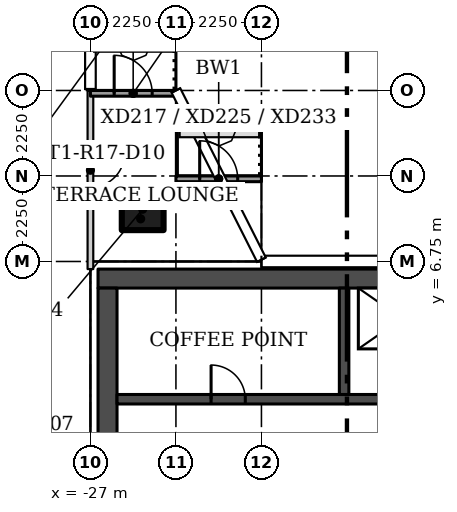
"""IFC4 building model, lengths in metres.
Left out: names, types, materials, properties, quantities, classifications, styles, units other than length and angle.
Written with IfcOpenShell. Run it as: python <this file> out.ifc"""

import sys

from ifc_helpers import new_model, si_unit, direction, frame, frame_2d, origin, origin_2d, place, context, subcontext, project, spatial, rectangle, hollow_rectangle, extrude, element, fill, save


model = new_model("IFC4")
c1 = context("Model", 3, precision=1e-05, world=origin(), true_north=direction((0.0, 1.0)))
c2 = subcontext(c1, "Body", "Model", "MODEL_VIEW")
j1 = project(units=[si_unit("LENGTHUNIT", "METRE"), si_unit("PLANEANGLEUNIT", "RADIAN")], contexts=[c1])
p1 = place(None, origin())
s1 = spatial("IfcSite", under=j1, at=p1, CompositionType="ELEMENT")
p2 = place(p1, origin())
s2 = spatial("IfcBuilding", under=s1, at=p2, CompositionType="ELEMENT")
p3 = place(p2, frame((0.0, 0.0, 150.6)))
s3 = spatial("IfcBuildingStorey", under=s2, at=p3, CompositionType="ELEMENT", Elevation=150.6)
p4 = place(p3, frame((-25.625, 8.125, 0.0)))
e1 = element("IfcColumn", 1, at=p4, inside=s3, PredefinedType="COLUMN", context=c2, shape_type="SweptSolid", body=[
    extrude(hollow_rectangle(XDim=1.1, YDim=1.1, WallThickness=0.04, at=origin_2d()), origin(), (0.0, 0.0, 1.0), 3.55),
])
p5 = place(p3, frame((-27.0, 11.25, 0.0), z_axis=(0.0, 0.0, 1.0), x_axis=(0.0, -1.0, 0.0)))
e2 = element("IfcWall", 2, at=p5, inside=s3, PredefinedType="PARTITIONING", context=c2, shape_type="SweptSolid", body=[
    extrude(rectangle(XDim=4.7, YDim=0.15, at=frame_2d((2.35, 0.0))), origin(), (0.0, 0.0, 1.0), 3.55),
])
p6 = place(p5, frame((1.65, 0.0, 0.0)))
e3 = element("IfcOpeningElement", 3, at=p6, cuts=e2, PredefinedType="OPENING", context=c2, shape_type="SweptSolid", body=[
    extrude(rectangle(XDim=0.9, YDim=2.1, at=frame_2d((0.45, 1.05))), frame((0.0, 0.085, 0.0), z_axis=(0.0, -1.0, 0.0), x_axis=(1.0, 0.0, 0.0)), (0.0, 0.0, 1.0), 0.17),
])
p7 = place(p3, frame((-24.75, 8.925, 0.0)))
e4 = element("IfcWall", 4, at=p7, inside=s3, PredefinedType="SOLIDWALL", context=c2, shape_type="SweptSolid", body=[
    extrude(rectangle(XDim=2.25, YDim=0.15, at=frame_2d((1.125, 0.0))), origin(), (0.0, 0.0, 1.0), 3.45),
])
p8 = place(p7, frame((0.625, 0.0, 0.0)))
e5 = element("IfcOpeningElement", 5, at=p8, cuts=e4, PredefinedType="OPENING", context=c2, shape_type="SweptSolid", body=[
    extrude(rectangle(XDim=1.0, YDim=2.4, at=frame_2d((0.5, 1.2))), frame((0.0, 0.085, 0.0), z_axis=(0.0, -1.0, 0.0), x_axis=(1.0, 0.0, 0.0)), (0.0, 0.0, 1.0), 0.17),
])
p9 = place(p3, frame((-27.0, 11.175, 0.0)))
e6 = element("IfcWall", 6, at=p9, inside=s3, PredefinedType="SOLIDWALL", context=c2, shape_type="SweptSolid", body=[
    extrude(rectangle(XDim=2.25, YDim=0.15, at=frame_2d((1.125, 0.0))), origin(), (0.0, 0.0, 1.0), 3.45),
])
p10 = place(p9, frame((0.625, 0.0, 0.0)))
e7 = element("IfcOpeningElement", 7, at=p10, cuts=e6, PredefinedType="OPENING", context=c2, shape_type="SweptSolid", body=[
    extrude(rectangle(XDim=1.0, YDim=2.4, at=frame_2d((0.5, 1.2))), frame((0.0, 0.085, 0.0), z_axis=(0.0, -1.0, 0.0), x_axis=(1.0, 0.0, 0.0)), (0.0, 0.0, 1.0), 0.17),
])
p11 = place(p3, frame((-26.8, 6.3, 0.0)))
e8 = element("IfcWall", 8, at=p11, inside=s3, PredefinedType="SHEAR", context=c2, shape_type="SweptSolid", body=[
    extrude(rectangle(XDim=13.1, YDim=0.5, at=frame_2d((6.55, 0.0))), origin(), (0.0, 0.0, 1.0), 3.55),
])
p12 = place(p3, frame((-26.55, 6.05, 0.0), z_axis=(0.0, 0.0, 1.0), x_axis=(0.0, -1.0, 0.0)))
e9 = element("IfcWall", 9, at=p12, inside=s3, PredefinedType="SHEAR", context=c2, shape_type="SweptSolid", body=[
    extrude(rectangle(XDim=12.1, YDim=0.5, at=frame_2d((6.05, 0.0))), origin(), (0.0, 0.0, 1.0), 3.55),
])
p13 = place(p12, frame((3.9, 0.0, 0.0)))
e10 = element("IfcOpeningElement", 10, at=p13, cuts=e9, PredefinedType="OPENING", context=c2, shape_type="SweptSolid", body=[
    extrude(rectangle(XDim=1.8, YDim=2.4, at=frame_2d((0.9, 1.2))), frame((0.0, 0.26, 0.0), z_axis=(0.0, -1.0, 0.0), x_axis=(1.0, 0.0, 0.0)), (0.0, 0.0, 1.0), 0.52),
])
p14 = place(p3, frame((-26.3, 3.125, 0.0)))
e11 = element("IfcWall", 11, at=p14, inside=s3, PredefinedType="SHEAR", context=c2, shape_type="SweptSolid", body=[
    extrude(rectangle(XDim=12.1, YDim=0.25, at=frame_2d((6.05, 0.0))), origin(), (0.0, 0.0, 1.0), 3.55),
])
p15 = place(p14, frame((6.95, 0.0, 0.0)))
e12 = element("IfcOpeningElement", 12, at=p15, cuts=e11, PredefinedType="OPENING", context=c2, shape_type="SweptSolid", body=[
    extrude(rectangle(XDim=1.1, YDim=2.1, at=frame_2d((0.55, 1.05))), frame((0.0, 0.135, 0.0), z_axis=(0.0, -1.0, 0.0), x_axis=(1.0, 0.0, 0.0)), (0.0, 0.0, 1.0), 0.27),
])
p16 = place(p14, frame((10.075, 0.0, 0.0)))
e13 = element("IfcOpeningElement", 13, at=p16, cuts=e11, PredefinedType="OPENING", context=c2, shape_type="SweptSolid", body=[
    extrude(rectangle(XDim=1.1, YDim=2.1, at=frame_2d((0.55, 1.05))), frame((0.0, 0.135, 0.0), z_axis=(0.0, -1.0, 0.0), x_axis=(1.0, 0.0, 0.0)), (0.0, 0.0, 1.0), 0.27),
])
p17 = place(p14, frame((2.475, 0.0, 0.0)))
e14 = element("IfcOpeningElement", 14, at=p17, cuts=e11, PredefinedType="OPENING", context=c2, shape_type="SweptSolid", body=[
    extrude(rectangle(XDim=0.9, YDim=2.1, at=frame_2d((0.45, 1.05))), frame((0.0, 0.135, 0.0), z_axis=(0.0, -1.0, 0.0), x_axis=(1.0, 0.0, 0.0)), (0.0, 0.0, 1.0), 0.27),
])
p18 = place(p3, frame((-20.325, 3.25, 0.0), z_axis=(0.0, 0.0, 1.0), x_axis=(0.0, 1.0, 0.0)))
e15 = element("IfcWall", 15, at=p18, inside=s3, PredefinedType="SHEAR", context=c2, shape_type="SweptSolid", body=[
    extrude(rectangle(XDim=2.8, YDim=0.25, at=frame_2d((1.4, 0.0))), origin(), (0.0, 0.0, 1.0), 3.55),
])
p19 = place(p6, origin())
e16 = element("IfcDoor", 16, at=p19, inside=s3, OperationType="SINGLE_SWING_LEFT", PredefinedType="DOOR", context=c2, shape_type="SweptSolid", body=[
    extrude(rectangle(XDim=0.9, YDim=2.1, at=frame_2d((0.45, 1.05))), frame((0.0, 0.025, 0.0), z_axis=(0.0, -1.0, 0.0), x_axis=(1.0, 0.0, 0.0)), (0.0, 0.0, 1.0), 0.05),
])
fill(e3, e16)
p20 = place(p8, origin())
e17 = element("IfcDoor", 17, at=p20, inside=s3, OperationType="SINGLE_SWING_RIGHT", PredefinedType="DOOR", context=c2, shape_type="SweptSolid", body=[
    extrude(rectangle(XDim=1.0, YDim=2.4, at=frame_2d((0.5, 1.2))), frame((0.0, 0.025, 0.0), z_axis=(0.0, -1.0, 0.0), x_axis=(1.0, 0.0, 0.0)), (0.0, 0.0, 1.0), 0.05),
])
fill(e5, e17)
p21 = place(p10, origin())
e18 = element("IfcDoor", 18, at=p21, inside=s3, OperationType="SINGLE_SWING_LEFT", PredefinedType="DOOR", context=c2, shape_type="SweptSolid", body=[
    extrude(rectangle(XDim=1.0, YDim=2.4, at=frame_2d((0.5, 1.2))), frame((0.0, 0.025, 0.0), z_axis=(0.0, -1.0, 0.0), x_axis=(1.0, 0.0, 0.0)), (0.0, 0.0, 1.0), 0.05),
])
fill(e7, e18)
p22 = place(p17, origin())
e19 = element("IfcDoor", 19, at=p22, inside=s3, OperationType="SINGLE_SWING_LEFT", PredefinedType="DOOR", context=c2, shape_type="SweptSolid", body=[
    extrude(rectangle(XDim=0.9, YDim=2.1, at=frame_2d((0.45, 1.05))), frame((0.0, 0.025, 0.0), z_axis=(0.0, -1.0, 0.0), x_axis=(1.0, 0.0, 0.0)), (0.0, 0.0, 1.0), 0.05),
])
fill(e14, e19)
save(model, sys.argv[1])
